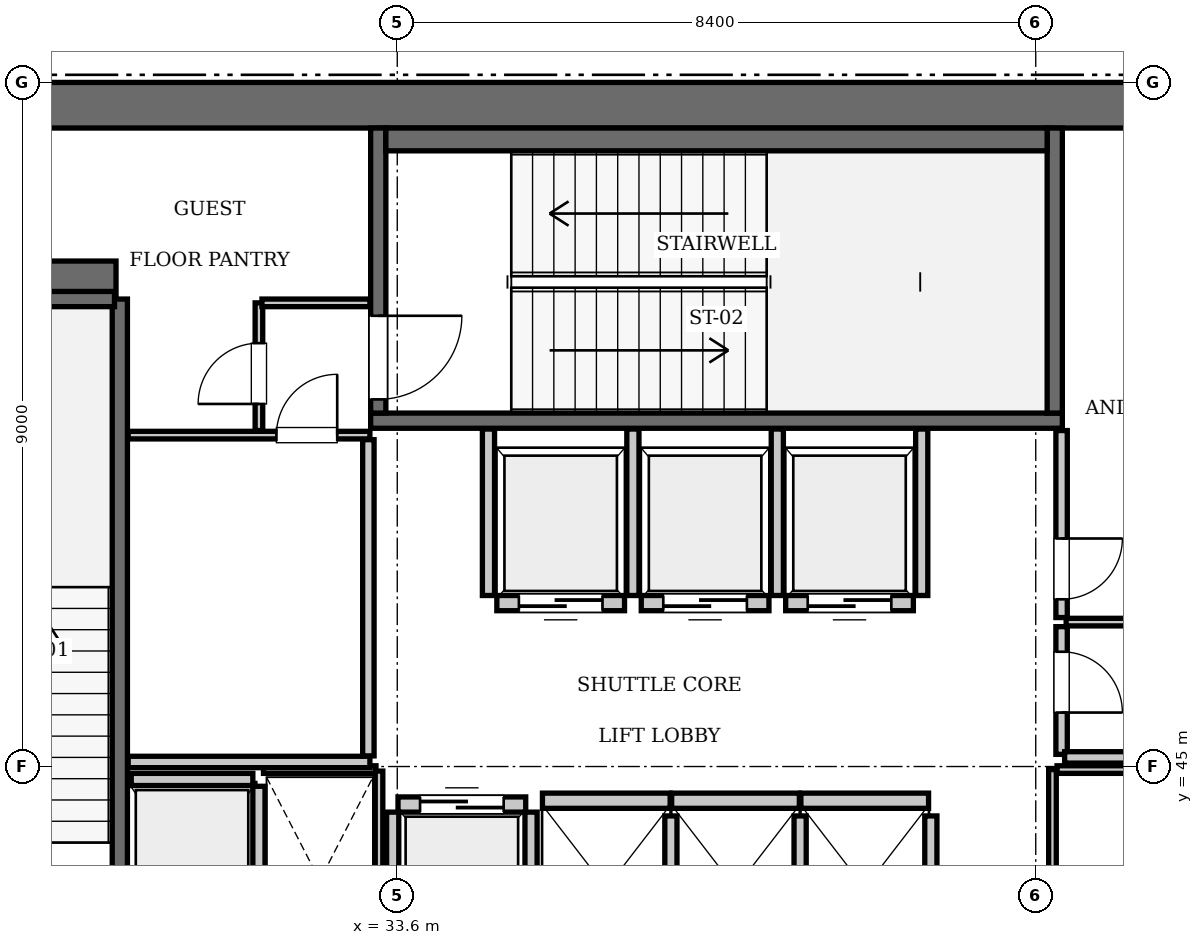
"""IFC4 building model, lengths in metres.
Left out: names, types, materials, properties, quantities, classifications, styles, units other than length and angle.
Written with IfcOpenShell. Run it as: python <this file> out.ifc"""

import sys

from ifc_helpers import new_model, si_unit, direction, frame, frame_2d, origin, place, context, subcontext, project, spatial, rectangle, extrude, element, fill, save


model = new_model("IFC4")
c1 = context("Model", 3, precision=1e-05, world=origin(), true_north=direction((0.0, 1.0)))
c2 = subcontext(c1, "Body", "Model", "MODEL_VIEW")
j1 = project(units=[si_unit("LENGTHUNIT", "METRE"), si_unit("PLANEANGLEUNIT", "RADIAN")], contexts=[c1])
p1 = place(None, origin())
s1 = spatial("IfcSite", under=j1, at=p1, CompositionType="ELEMENT")
p2 = place(p1, origin())
s2 = spatial("IfcBuilding", under=s1, at=p2, CompositionType="ELEMENT")
p3 = place(p2, frame((0.0, 0.0, 345.1)))
s3 = spatial("IfcBuildingStorey", under=s2, at=p3, CompositionType="ELEMENT", Elevation=345.1)
p4 = place(p3, frame((25.2, 53.7, 0.0), z_axis=(0.0, 0.0, 1.0), x_axis=(1.0, 0.0, 0.0)))
e1 = element("IfcWall", 1, at=p4, inside=s3, PredefinedType="SHEAR", context=c2, shape_type="SweptSolid", body=[
    extrude(rectangle(XDim=25.2, YDim=0.6, at=frame_2d((12.6, 0.0))), origin(), (0.0, 0.0, 1.0), 4.55),
])
p5 = place(p3, frame((25.8, 51.4, 0.0), z_axis=(0.0, 0.0, 1.0), x_axis=(1.0, 0.0, 0.0)))
e2 = element("IfcWall", 2, at=p5, inside=s3, PredefinedType="SHEAR", context=c2, shape_type="SweptSolid", body=[
    extrude(rectangle(XDim=4.1, YDim=0.5, at=frame_2d((2.05, 0.0))), origin(), (0.0, 0.0, 1.0), 4.55),
])
p6 = place(p3, frame((29.95, 42.0, 0.0), z_axis=(0.0, 0.0, 1.0), x_axis=(0.0, 1.0, 0.0)))
e3 = element("IfcWall", 3, at=p6, inside=s3, PredefinedType="SOLIDWALL", context=c2, shape_type="SweptSolid", body=[
    extrude(rectangle(XDim=9.15, YDim=0.2, at=frame_2d((4.575, 0.0))), origin(), (0.0, 0.0, 1.0), 4.31),
])
p7 = place(p3, frame((26.38, 51.15, 0.0), z_axis=(0.0, 0.0, 1.0), x_axis=(1.0, 0.0, 0.0)))
e4 = element("IfcWall", 4, at=p7, inside=s3, PredefinedType="SOLIDWALL", context=c2, shape_type="SweptSolid", body=[
    extrude(rectangle(XDim=3.5, YDim=0.2, at=frame_2d((1.75, 0.0))), origin(), (0.0, 0.0, 1.0), 4.31),
])
p8 = place(p3, frame((33.25, 49.55, 0.0), z_axis=(0.0, 0.0, 1.0), x_axis=(1.0, 0.0, 0.0)))
e5 = element("IfcWall", 5, at=p8, inside=s3, PredefinedType="SOLIDWALL", context=c2, shape_type="SweptSolid", body=[
    extrude(rectangle(XDim=9.1, YDim=0.2, at=frame_2d((4.55, 0.0))), origin(), (0.0, 0.0, 1.0), 4.31),
])
p9 = place(p3, frame((42.25, 49.65, 0.0), z_axis=(0.0, 0.0, 1.0), x_axis=(0.0, 1.0, 0.0)))
e6 = element("IfcWall", 6, at=p9, inside=s3, PredefinedType="SOLIDWALL", context=c2, shape_type="SweptSolid", body=[
    extrude(rectangle(XDim=3.75, YDim=0.2, at=frame_2d((1.875, 0.0))), origin(), (0.0, 0.0, 1.0), 4.31),
])
p10 = place(p3, frame((33.35, 49.65, 0.0), z_axis=(0.0, 0.0, 1.0), x_axis=(0.0, 1.0, 0.0)))
e7 = element("IfcWall", 7, at=p10, inside=s3, PredefinedType="SOLIDWALL", context=c2, shape_type="SweptSolid", body=[
    extrude(rectangle(XDim=3.75, YDim=0.2, at=frame_2d((1.875, 0.0))), origin(), (0.0, 0.0, 1.0), 4.31),
])
p11 = place(p10, frame((0.18, 0.0, 0.0)))
e8 = element("IfcOpeningElement", 8, at=p11, cuts=e7, PredefinedType="OPENING", context=c2, shape_type="SweptSolid", body=[
    extrude(rectangle(XDim=1.1, YDim=2.15, at=frame_2d((0.55, 1.075))), frame((0.0, 0.11, 0.0), z_axis=(0.0, -1.0, 0.0), x_axis=(1.0, 0.0, 0.0)), (0.0, 0.0, 1.0), 0.22),
])
p12 = place(p3, frame((33.45, 53.25, 0.0), z_axis=(0.0, 0.0, 1.0), x_axis=(1.0, 0.0, 0.0)))
e9 = element("IfcWall", 9, at=p12, inside=s3, PredefinedType="SOLIDWALL", context=c2, shape_type="SweptSolid", body=[
    extrude(rectangle(XDim=8.7, YDim=0.3, at=frame_2d((4.35, 0.0))), origin(), (0.0, 0.0, 1.0), 4.31),
])
for number, where, z_axis, x_axis in (
    (10, (35.51, 44.55, 0.0), (0.0, 0.0, 1.0), (1.0, 0.0, 0.0)),
    (11, (37.21, 44.55, 0.0), (0.0, 0.0, 1.0), (1.0, 0.0, 0.0)),
):
    element("IfcWall", number, at=place(p3, frame(where, z_axis=z_axis, x_axis=x_axis)), inside=s3, PredefinedType="SOLIDWALL", context=c2, shape_type="SweptSolid", body=[
        extrude(rectangle(XDim=1.68, YDim=0.2, at=frame_2d((0.84, 0.0))), origin(), (0.0, 0.0, 1.0), 4.31),
    ])
p13 = place(p3, frame((38.91, 44.55, 0.0), z_axis=(0.0, 0.0, 1.0), x_axis=(1.0, 0.0, 0.0)))
e12 = element("IfcWall", 12, at=p13, inside=s3, PredefinedType="SOLIDWALL", context=c2, shape_type="SweptSolid", body=[
    extrude(rectangle(XDim=1.68, YDim=0.2, at=frame_2d((0.84, 0.0))), origin(), (0.0, 0.0, 1.0), 4.31),
])
p14 = place(p3, frame((34.91, 47.15, 0.0), z_axis=(0.0, 0.0, 1.0), x_axis=(1.0, 0.0, 0.0)))
e13 = element("IfcWall", 13, at=p14, inside=s3, PredefinedType="SOLIDWALL", context=c2, shape_type="SweptSolid", body=[
    extrude(rectangle(XDim=1.68, YDim=0.2, at=frame_2d((0.84, 0.0))), origin(), (0.0, 0.0, 1.0), 4.31),
])
p15 = place(p14, frame((0.29, 0.0, 0.0)))
e14 = element("IfcOpeningElement", 14, at=p15, cuts=e13, PredefinedType="OPENING", context=c2, shape_type="SweptSolid", body=[
    extrude(rectangle(XDim=1.1, YDim=2.2, at=frame_2d((0.55, 1.1))), frame((0.0, 0.11, 0.0), z_axis=(0.0, -1.0, 0.0), x_axis=(1.0, 0.0, 0.0)), (0.0, 0.0, 1.0), 0.22),
])
p16 = place(p3, frame((36.81, 47.15, 0.0), z_axis=(0.0, 0.0, 1.0), x_axis=(1.0, 0.0, 0.0)))
e15 = element("IfcWall", 15, at=p16, inside=s3, PredefinedType="SOLIDWALL", context=c2, shape_type="SweptSolid", body=[
    extrude(rectangle(XDim=1.68, YDim=0.2, at=frame_2d((0.84, 0.0))), origin(), (0.0, 0.0, 1.0), 4.31),
])
p17 = place(p16, frame((0.29, 0.0, 0.0)))
e16 = element("IfcOpeningElement", 16, at=p17, cuts=e15, PredefinedType="OPENING", context=c2, shape_type="SweptSolid", body=[
    extrude(rectangle(XDim=1.1, YDim=2.2, at=frame_2d((0.55, 1.1))), frame((0.0, 0.11, 0.0), z_axis=(0.0, -1.0, 0.0), x_axis=(1.0, 0.0, 0.0)), (0.0, 0.0, 1.0), 0.22),
])
p18 = place(p3, frame((38.71, 47.15, 0.0), z_axis=(0.0, 0.0, 1.0), x_axis=(1.0, 0.0, 0.0)))
e17 = element("IfcWall", 17, at=p18, inside=s3, PredefinedType="SOLIDWALL", context=c2, shape_type="SweptSolid", body=[
    extrude(rectangle(XDim=1.68, YDim=0.2, at=frame_2d((0.84, 0.0))), origin(), (0.0, 0.0, 1.0), 4.31),
])
p19 = place(p18, frame((0.29, 0.0, 0.0)))
e18 = element("IfcOpeningElement", 18, at=p19, cuts=e17, PredefinedType="OPENING", context=c2, shape_type="SweptSolid", body=[
    extrude(rectangle(XDim=1.1, YDim=2.2, at=frame_2d((0.55, 1.1))), frame((0.0, 0.11, 0.0), z_axis=(0.0, -1.0, 0.0), x_axis=(1.0, 0.0, 0.0)), (0.0, 0.0, 1.0), 0.22),
])
p20 = place(p3, frame((33.61, 44.5, 0.0), z_axis=(0.0, 0.0, 1.0), x_axis=(1.0, 0.0, 0.0)))
e19 = element("IfcWall", 19, at=p20, inside=s3, PredefinedType="SOLIDWALL", context=c2, shape_type="SweptSolid", body=[
    extrude(rectangle(XDim=1.68, YDim=0.2, at=frame_2d((0.84, 0.0))), origin(), (0.0, 0.0, 1.0), 4.31),
])
p21 = place(p20, frame((0.29, 0.0, 0.0)))
e20 = element("IfcOpeningElement", 20, at=p21, cuts=e19, PredefinedType="OPENING", context=c2, shape_type="SweptSolid", body=[
    extrude(rectangle(XDim=1.1, YDim=2.2, at=frame_2d((0.55, 1.1))), frame((0.0, 0.11, 0.0), z_axis=(0.0, -1.0, 0.0), x_axis=(1.0, 0.0, 0.0)), (0.0, 0.0, 1.0), 0.22),
])
p22 = place(p3, frame((30.1, 44.83, 0.0), z_axis=(0.0, 0.0, 1.0), x_axis=(1.0, 0.0, 0.0)))
e21 = element("IfcWall", 21, at=p22, inside=s3, PredefinedType="SOLIDWALL", context=c2, shape_type="SweptSolid", body=[
    extrude(rectangle(XDim=1.6, YDim=0.16, at=frame_2d((0.8, 0.0))), origin(), (0.0, 0.0, 1.0), 4.31),
])
p23 = place(p3, frame((31.78, 42.0, 0.0), z_axis=(0.0, 0.0, 1.0), x_axis=(0.0, 1.0, 0.0)))
e22 = element("IfcWall", 22, at=p23, inside=s3, PredefinedType="SOLIDWALL", context=c2, shape_type="SweptSolid", body=[
    extrude(rectangle(XDim=2.74, YDim=0.16, at=frame_2d((1.37, 0.0))), origin(), (0.0, 0.0, 1.0), 4.31),
])
for number, where, z_axis, x_axis in (
    (23, (37.2, 42.0, 0.0), (0.0, 0.0, 1.0), (0.0, 1.0, 0.0)),
    (24, (38.9, 42.0, 0.0), (0.0, 0.0, 1.0), (0.0, 1.0, 0.0)),
    (25, (40.62, 42.0, 0.0), (0.0, 0.0, 1.0), (0.0, 1.0, 0.0)),
):
    element("IfcWall", number, at=place(p3, frame(where, z_axis=z_axis, x_axis=x_axis)), inside=s3, PredefinedType="SOLIDWALL", context=c2, shape_type="SweptSolid", body=[
        extrude(rectangle(XDim=2.35, YDim=0.16, at=frame_2d((1.175, 0.0))), origin(), (0.0, 0.0, 1.0), 4.31),
    ])
for number, where, z_axis, x_axis in (
    (26, (34.8, 47.25, 0.0), (0.0, 0.0, 1.0), (0.0, 1.0, 0.0)),
    (27, (36.7, 47.25, 0.0), (0.0, 0.0, 1.0), (0.0, 1.0, 0.0)),
    (28, (38.6, 47.25, 0.0), (0.0, 0.0, 1.0), (0.0, 1.0, 0.0)),
    (29, (40.5, 47.25, 0.0), (0.0, 0.0, 1.0), (0.0, 1.0, 0.0)),
):
    element("IfcWall", number, at=place(p3, frame(where, z_axis=z_axis, x_axis=x_axis)), inside=s3, PredefinedType="SOLIDWALL", context=c2, shape_type="SweptSolid", body=[
        extrude(rectangle(XDim=2.19, YDim=0.16, at=frame_2d((1.095, 0.0))), origin(), (0.0, 0.0, 1.0), 4.31),
    ])
for number, where, z_axis, x_axis in (
    (30, (33.54, 42.0, 0.0), (0.0, 0.0, 1.0), (0.0, 1.0, 0.0)),
    (31, (35.36, 42.0, 0.0), (0.0, 0.0, 1.0), (0.0, 1.0, 0.0)),
):
    element("IfcWall", number, at=place(p3, frame(where, z_axis=z_axis, x_axis=x_axis)), inside=s3, PredefinedType="SOLIDWALL", context=c2, shape_type="SweptSolid", body=[
        extrude(rectangle(XDim=2.4, YDim=0.16, at=frame_2d((1.2, 0.0))), origin(), (0.0, 0.0, 1.0), 4.31),
    ])
p24 = place(p3, frame((31.84, 44.96, 0.0), z_axis=(0.0, 0.0, 1.0), x_axis=(1.0, 0.0, 0.0)))
e32 = element("IfcWall", 32, at=p24, inside=s3, PredefinedType="PARTITIONING", context=c2, shape_type="SweptSolid", body=[
    extrude(rectangle(XDim=1.48, YDim=0.1, at=frame_2d((0.74, 0.0))), origin(), (0.0, 0.0, 1.0), 4.31),
])
p25 = place(p3, frame((33.36, 42.06, 0.0), z_axis=(0.0, 0.0, 1.0), x_axis=(0.0, 1.0, 0.0)))
e33 = element("IfcWall", 33, at=p25, inside=s3, PredefinedType="PARTITIONING", context=c2, shape_type="SweptSolid", body=[
    extrude(rectangle(XDim=2.88, YDim=0.1, at=frame_2d((1.44, 0.0))), origin(), (0.0, 0.0, 1.0), 4.31),
])
p26 = place(p3, frame((42.22, 42.05, 0.0), z_axis=(0.0, 0.0, 1.0), x_axis=(0.0, 1.0, 0.0)))
e34 = element("IfcWall", 34, at=p26, inside=s3, PredefinedType="PARTITIONING", context=c2, shape_type="SweptSolid", body=[
    extrude(rectangle(XDim=2.91, YDim=0.1, at=frame_2d((1.455, 0.0))), origin(), (0.0, 0.0, 1.0), 4.31),
])
p27 = place(p26, frame((0.65, 0.0, 0.0)))
e35 = element("IfcOpeningElement", 35, at=p27, cuts=e34, PredefinedType="OPENING", context=c2, shape_type="SweptSolid", body=[
    extrude(rectangle(XDim=0.8, YDim=2.05, at=frame_2d((0.4, 1.025))), frame((0.0, 0.06, 0.0), z_axis=(0.0, -1.0, 0.0), x_axis=(1.0, 0.0, 0.0)), (0.0, 0.0, 1.0), 0.12),
])
p28 = place(p3, frame((42.28, 44.96, 0.0), z_axis=(0.0, 0.0, 1.0), x_axis=(1.0, 0.0, 0.0)))
e36 = element("IfcWall", 36, at=p28, inside=s3, PredefinedType="PARTITIONING", context=c2, shape_type="SweptSolid", body=[
    extrude(rectangle(XDim=1.3, YDim=0.1, at=frame_2d((0.65, 0.0))), origin(), (0.0, 0.0, 1.0), 4.31),
])
p29 = place(p3, frame((30.06, 45.06, 0.0), z_axis=(0.0, 0.0, 1.0), x_axis=(1.0, 0.0, 0.0)))
e37 = element("IfcWall", 37, at=p29, inside=s3, PredefinedType="PARTITIONING", context=c2, shape_type="SweptSolid", body=[
    extrude(rectangle(XDim=3.18, YDim=0.15, at=frame_2d((1.59, 0.0))), origin(), (0.0, 0.0, 1.0), 4.31),
])
p30 = place(p3, frame((33.22, 45.14, 0.0), z_axis=(0.0, 0.0, 1.0), x_axis=(0.0, 1.0, 0.0)))
e38 = element("IfcWall", 38, at=p30, inside=s3, PredefinedType="PARTITIONING", context=c2, shape_type="SweptSolid", body=[
    extrude(rectangle(XDim=4.16, YDim=0.15, at=frame_2d((2.08, 0.0))), origin(), (0.0, 0.0, 1.0), 4.31),
])
p31 = place(p3, frame((30.06, 49.36, 0.0), z_axis=(0.0, 0.0, 1.0), x_axis=(1.0, 0.0, 0.0)))
e39 = element("IfcWall", 39, at=p31, inside=s3, PredefinedType="PARTITIONING", context=c2, shape_type="SweptSolid", body=[
    extrude(rectangle(XDim=3.18, YDim=0.1, at=frame_2d((1.59, 0.0))), origin(), (0.0, 0.0, 1.0), 4.31),
])
p32 = place(p31, frame((1.95, 0.0, 0.0)))
e40 = element("IfcOpeningElement", 40, at=p32, cuts=e39, PredefinedType="OPENING", context=c2, shape_type="SweptSolid", body=[
    extrude(rectangle(XDim=0.8, YDim=2.05, at=frame_2d((0.4, 1.025))), frame((0.0, 0.06, 0.0), z_axis=(0.0, -1.0, 0.0), x_axis=(1.0, 0.0, 0.0)), (0.0, 0.0, 1.0), 0.12),
])
p33 = place(p3, frame((31.78, 49.42, 0.0), z_axis=(0.0, 0.0, 1.0), x_axis=(0.0, 1.0, 0.0)))
e41 = element("IfcWall", 41, at=p33, inside=s3, PredefinedType="PARTITIONING", context=c2, shape_type="SweptSolid", body=[
    extrude(rectangle(XDim=1.68, YDim=0.1, at=frame_2d((0.84, 0.0))), origin(), (0.0, 0.0, 1.0), 4.31),
])
p34 = place(p33, frame((0.35, 0.0, 0.0)))
e42 = element("IfcOpeningElement", 42, at=p34, cuts=e41, PredefinedType="OPENING", context=c2, shape_type="SweptSolid", body=[
    extrude(rectangle(XDim=0.8, YDim=2.05, at=frame_2d((0.4, 1.025))), frame((0.0, 0.06, 0.0), z_axis=(0.0, -1.0, 0.0), x_axis=(1.0, 0.0, 0.0)), (0.0, 0.0, 1.0), 0.12),
])
p35 = place(p3, frame((31.82, 51.1, 0.0), z_axis=(0.0, 0.0, 1.0), x_axis=(1.0, 0.0, 0.0)))
e43 = element("IfcWall", 43, at=p35, inside=s3, PredefinedType="PARTITIONING", context=c2, shape_type="SweptSolid", body=[
    extrude(rectangle(XDim=1.42, YDim=0.1, at=frame_2d((0.71, 0.0))), origin(), (0.0, 0.0, 1.0), 4.31),
])
p36 = place(p3, frame((42.34, 45.16, 0.0), z_axis=(0.0, 0.0, 1.0), x_axis=(0.0, 1.0, 0.0)))
e44 = element("IfcWall", 44, at=p36, inside=s3, PredefinedType="PARTITIONING", context=c2, shape_type="SweptSolid", body=[
    extrude(rectangle(XDim=1.68, YDim=0.15, at=frame_2d((0.84, 0.0))), origin(), (0.0, 0.0, 1.0), 4.31),
])
p37 = place(p36, frame((0.55, 0.0, 0.0)))
e45 = element("IfcOpeningElement", 45, at=p37, cuts=e44, PredefinedType="OPENING", context=c2, shape_type="SweptSolid", body=[
    extrude(rectangle(XDim=0.8, YDim=2.05, at=frame_2d((0.4, 1.025))), frame((0.0, 0.085, 0.0), z_axis=(0.0, -1.0, 0.0), x_axis=(1.0, 0.0, 0.0)), (0.0, 0.0, 1.0), 0.17),
])
p38 = place(p3, frame((42.34, 46.96, 0.0), z_axis=(0.0, 0.0, 1.0), x_axis=(0.0, 1.0, 0.0)))
e46 = element("IfcWall", 46, at=p38, inside=s3, PredefinedType="PARTITIONING", context=c2, shape_type="SweptSolid", body=[
    extrude(rectangle(XDim=2.46, YDim=0.15, at=frame_2d((1.23, 0.0))), origin(), (0.0, 0.0, 1.0), 4.31),
])
p39 = place(p38, frame((0.24, 0.0, 0.0)))
e47 = element("IfcOpeningElement", 47, at=p39, cuts=e46, PredefinedType="OPENING", context=c2, shape_type="SweptSolid", body=[
    extrude(rectangle(XDim=0.8, YDim=2.05, at=frame_2d((0.4, 1.025))), frame((0.0, 0.085, 0.0), z_axis=(0.0, -1.0, 0.0), x_axis=(1.0, 0.0, 0.0)), (0.0, 0.0, 1.0), 0.17),
])
p40 = place(p3, frame((42.4, 46.9, 0.0), z_axis=(0.0, 0.0, 1.0), x_axis=(1.0, 0.0, 0.0)))
e48 = element("IfcWall", 48, at=p40, inside=s3, PredefinedType="PARTITIONING", context=c2, shape_type="SweptSolid", body=[
    extrude(rectangle(XDim=3.1, YDim=0.1, at=frame_2d((1.55, 0.0))), origin(), (0.0, 0.0, 1.0), 4.31),
])
p41 = place(p3, frame((42.38, 45.12, 0.0), z_axis=(0.0, 0.0, 1.0), x_axis=(1.0, 0.0, 0.0)))
e49 = element("IfcWall", 49, at=p41, inside=s3, PredefinedType="PARTITIONING", context=c2, shape_type="SweptSolid", body=[
    extrude(rectangle(XDim=3.14, YDim=0.15, at=frame_2d((1.57, 0.0))), origin(), (0.0, 0.0, 1.0), 4.31),
])
p42 = place(p11, frame((1.1, 0.0, 0.0), z_axis=(0.0, 0.0, 1.0), x_axis=(-1.0, 0.0, 0.0)))
e50 = element("IfcDoor", 50, at=p42, inside=s3, OperationType="SINGLE_SWING_LEFT", PredefinedType="DOOR", context=c2, shape_type="SweptSolid", body=[
    extrude(rectangle(XDim=1.1, YDim=2.15, at=frame_2d((0.55, 1.075))), frame((0.0, 0.025, 0.0), z_axis=(0.0, -1.0, 0.0), x_axis=(1.0, 0.0, 0.0)), (0.0, 0.0, 1.0), 0.05),
])
fill(e8, e50)
p43 = place(p15, frame((1.1, 0.0, 0.0), z_axis=(0.0, 0.0, 1.0), x_axis=(-1.0, 0.0, 0.0)))
e51 = element("IfcDoor", 51, at=p43, inside=s3, OperationType="SLIDING_TO_RIGHT", PredefinedType="DOOR", context=c2, shape_type="SweptSolid", body=[
    extrude(rectangle(XDim=1.1, YDim=2.2, at=frame_2d((0.55, 1.1))), frame((0.0, 0.025, 0.0), z_axis=(0.0, -1.0, 0.0), x_axis=(1.0, 0.0, 0.0)), (0.0, 0.0, 1.0), 0.05),
])
fill(e14, e51)
p44 = place(p17, frame((1.1, 0.0, 0.0), z_axis=(0.0, 0.0, 1.0), x_axis=(-1.0, 0.0, 0.0)))
e52 = element("IfcDoor", 52, at=p44, inside=s3, OperationType="SLIDING_TO_RIGHT", PredefinedType="DOOR", context=c2, shape_type="SweptSolid", body=[
    extrude(rectangle(XDim=1.1, YDim=2.2, at=frame_2d((0.55, 1.1))), frame((0.0, 0.025, 0.0), z_axis=(0.0, -1.0, 0.0), x_axis=(1.0, 0.0, 0.0)), (0.0, 0.0, 1.0), 0.05),
])
fill(e16, e52)
p45 = place(p19, frame((1.1, 0.0, 0.0), z_axis=(0.0, 0.0, 1.0), x_axis=(-1.0, 0.0, 0.0)))
e53 = element("IfcDoor", 53, at=p45, inside=s3, OperationType="SLIDING_TO_RIGHT", PredefinedType="DOOR", context=c2, shape_type="SweptSolid", body=[
    extrude(rectangle(XDim=1.1, YDim=2.2, at=frame_2d((0.55, 1.1))), frame((0.0, 0.025, 0.0), z_axis=(0.0, -1.0, 0.0), x_axis=(1.0, 0.0, 0.0)), (0.0, 0.0, 1.0), 0.05),
])
fill(e18, e53)
p46 = place(p21, origin())
e54 = element("IfcDoor", 54, at=p46, inside=s3, OperationType="SLIDING_TO_RIGHT", PredefinedType="DOOR", context=c2, shape_type="SweptSolid", body=[
    extrude(rectangle(XDim=1.1, YDim=2.2, at=frame_2d((0.55, 1.1))), frame((0.0, 0.025, 0.0), z_axis=(0.0, -1.0, 0.0), x_axis=(1.0, 0.0, 0.0)), (0.0, 0.0, 1.0), 0.05),
])
fill(e20, e54)
p47 = place(p32, origin())
e55 = element("IfcDoor", 55, at=p47, inside=s3, OperationType="SINGLE_SWING_RIGHT", PredefinedType="DOOR", context=c2, shape_type="SweptSolid", body=[
    extrude(rectangle(XDim=0.8, YDim=2.05, at=frame_2d((0.4, 1.025))), frame((0.0, 0.025, 0.0), z_axis=(0.0, -1.0, 0.0), x_axis=(1.0, 0.0, 0.0)), (0.0, 0.0, 1.0), 0.05),
])
fill(e40, e55)
p48 = place(p34, origin())
e56 = element("IfcDoor", 56, at=p48, inside=s3, OperationType="SINGLE_SWING_LEFT", PredefinedType="DOOR", context=c2, shape_type="SweptSolid", body=[
    extrude(rectangle(XDim=0.8, YDim=2.05, at=frame_2d((0.4, 1.025))), frame((0.0, 0.025, 0.0), z_axis=(0.0, -1.0, 0.0), x_axis=(1.0, 0.0, 0.0)), (0.0, 0.0, 1.0), 0.05),
])
fill(e42, e56)
p49 = place(p37, frame((0.8, 0.0, 0.0), z_axis=(0.0, 0.0, 1.0), x_axis=(-1.0, 0.0, 0.0)))
e57 = element("IfcDoor", 57, at=p49, inside=s3, OperationType="SINGLE_SWING_RIGHT", PredefinedType="DOOR", context=c2, shape_type="SweptSolid", body=[
    extrude(rectangle(XDim=0.8, YDim=2.05, at=frame_2d((0.4, 1.025))), frame((0.0, 0.025, 0.0), z_axis=(0.0, -1.0, 0.0), x_axis=(1.0, 0.0, 0.0)), (0.0, 0.0, 1.0), 0.05),
])
fill(e45, e57)
p50 = place(p39, frame((0.8, 0.0, 0.0), z_axis=(0.0, 0.0, 1.0), x_axis=(-1.0, 0.0, 0.0)))
e58 = element("IfcDoor", 58, at=p50, inside=s3, OperationType="SINGLE_SWING_LEFT", PredefinedType="DOOR", context=c2, shape_type="SweptSolid", body=[
    extrude(rectangle(XDim=0.8, YDim=2.05, at=frame_2d((0.4, 1.025))), frame((0.0, 0.025, 0.0), z_axis=(0.0, -1.0, 0.0), x_axis=(1.0, 0.0, 0.0)), (0.0, 0.0, 1.0), 0.05),
])
fill(e47, e58)
save(model, sys.argv[1])
